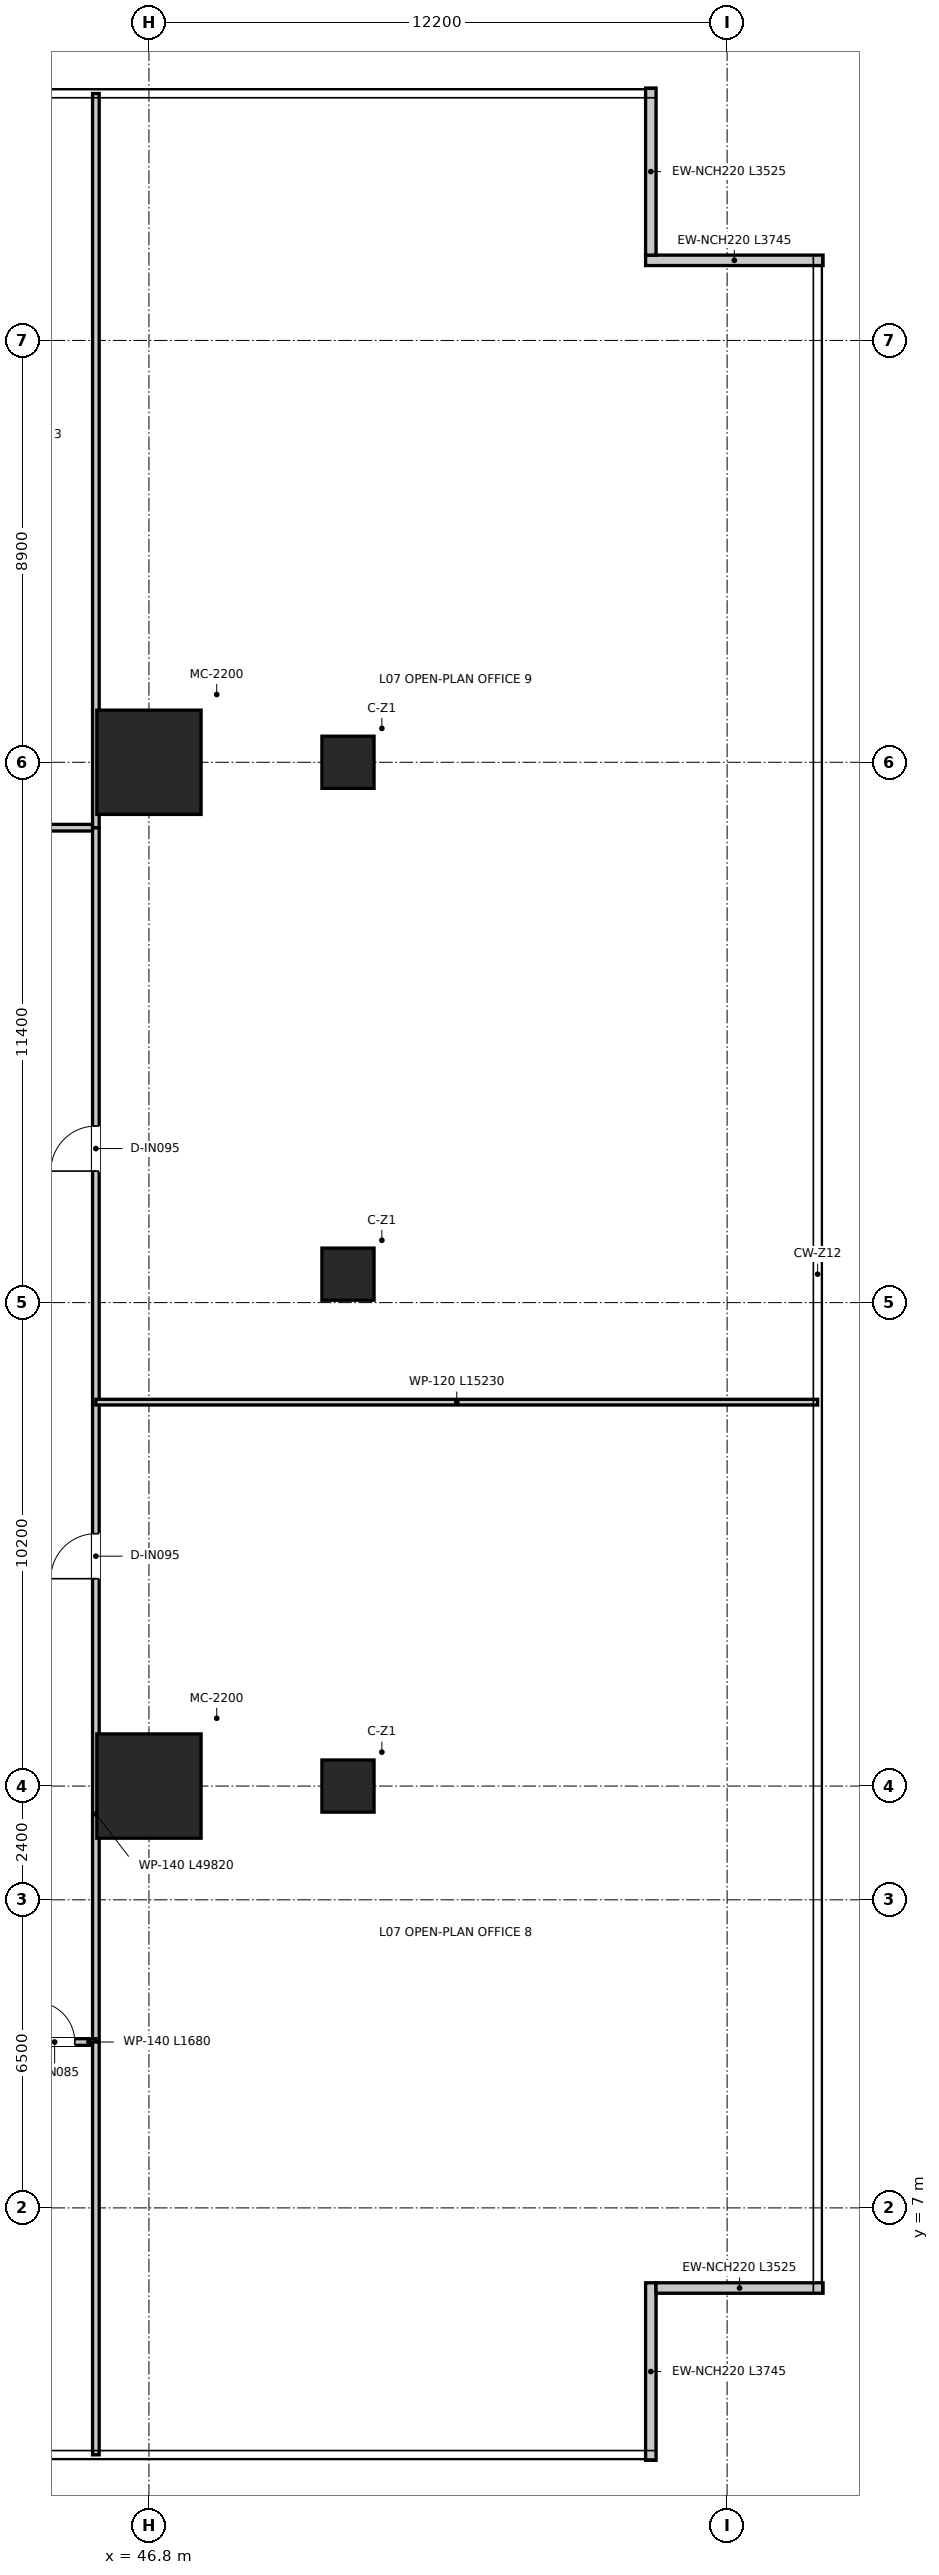
"""IFC4 building model, lengths in metres.
Left out: names, types, materials, properties, quantities, classifications, styles, units other than length and angle.
Written with IfcOpenShell. Run it as: python <this file> out.ifc"""

import sys

from ifc_helpers import new_model, si_unit, direction, frame, frame_2d, origin, origin_2d, place, context, subcontext, project, spatial, rectangle, extrude, source, transform, mapped, element, fill, save


model = new_model("IFC4")
c1 = context("Model", 3, precision=1e-05, world=origin(), true_north=direction((0.0, 1.0)))
c2 = subcontext(c1, "Body", "Model", "MODEL_VIEW")
j1 = project(units=[si_unit("LENGTHUNIT", "METRE"), si_unit("PLANEANGLEUNIT", "RADIAN")], contexts=[c1])
p1 = place(None, origin())
s1 = spatial("IfcSite", under=j1, at=p1, CompositionType="ELEMENT")
p2 = place(p1, origin())
s2 = spatial("IfcBuilding", under=s1, at=p2, CompositionType="ELEMENT")
p3 = place(p2, frame((0.0, 0.0, 32.9)))
s3 = spatial("IfcBuildingStorey", under=s2, at=p3, CompositionType="ELEMENT", Elevation=32.9)
m1 = source(origin(), c2, "Body", "SweptSolid", [
    extrude(rectangle(XDim=2.2, YDim=2.2, at=origin_2d()), origin(), (0.0, 0.0, 1.0), 3.95),
])
for number, where, z_axis, x_axis in (
    (1, (46.8, 15.9, 0.0), (0.0, 0.0, 1.0), (1.0, 0.0, 0.0)),
    (2, (46.8, 37.5, 0.0), (0.0, 0.0, 1.0), (1.0, 0.0, 0.0)),
):
    element("IfcColumn", number, at=place(p3, frame(where, z_axis=z_axis, x_axis=x_axis)), inside=s3, PredefinedType="USERDEFINED", context=c2, shape_type="MappedRepresentation", body=[
        mapped(m1, transform((0.0, 0.0, 0.0), x_axis=(1.0, 0.0, 0.0), y_axis=(0.0, 1.0, 0.0), z_axis=(0.0, 0.0, 1.0), scale=1.0)),
    ])
m2 = source(origin(), c2, "Body", "SweptSolid", [
    extrude(rectangle(XDim=1.1, YDim=1.1, at=origin_2d()), origin(), (0.0, 0.0, 1.0), 3.95),
])
for number, where, z_axis, x_axis in (
    (3, (51.0, 37.5, 0.0), (0.0, 0.0, 1.0), (1.0, 0.0, 0.0)),
    (4, (51.0, 26.7, 0.0), (0.0, 0.0, 1.0), (1.0, 0.0, 0.0)),
    (5, (51.0, 15.9, 0.0), (0.0, 0.0, 1.0), (1.0, 0.0, 0.0)),
):
    element("IfcColumn", number, at=place(p3, frame(where, z_axis=z_axis, x_axis=x_axis)), inside=s3, PredefinedType="COLUMN", context=c2, shape_type="MappedRepresentation", body=[
        mapped(m2, transform((0.0, 0.0, 0.0), x_axis=(1.0, 0.0, 0.0), y_axis=(0.0, 1.0, 0.0), z_axis=(0.0, 0.0, 1.0), scale=1.0)),
    ])
p4 = place(p3, frame((57.39, 1.675, 0.0), z_axis=(0.0, 0.0, 1.0), x_axis=(0.0, 1.0, 0.0)))
e6 = element("IfcWall", 6, at=p4, inside=s3, PredefinedType="ELEMENTEDWALL", context=c2, shape_type="SweptSolid", body=[
    extrude(rectangle(XDim=3.745, YDim=0.22, at=frame_2d((1.873, 0.0))), origin(), (0.0, 0.0, 1.0), 3.67),
])
p5 = place(p3, frame((57.5, 5.31, 0.0), z_axis=(0.0, 0.0, 1.0), x_axis=(1.0, 0.0, 0.0)))
e7 = element("IfcWall", 7, at=p5, inside=s3, PredefinedType="ELEMENTEDWALL", context=c2, shape_type="SweptSolid", body=[
    extrude(rectangle(XDim=3.525, YDim=0.22, at=frame_2d((1.762, 0.0))), origin(), (0.0, 0.0, 1.0), 3.67),
])
p6 = place(p3, frame((61.025, 48.09, 0.0), z_axis=(0.0, 0.0, 1.0), x_axis=(-1.0, 0.0, 0.0)))
e8 = element("IfcWall", 8, at=p6, inside=s3, PredefinedType="ELEMENTEDWALL", context=c2, shape_type="SweptSolid", body=[
    extrude(rectangle(XDim=3.745, YDim=0.22, at=frame_2d((1.873, 0.0))), origin(), (0.0, 0.0, 1.0), 3.67),
])
p7 = place(p3, frame((57.39, 48.2, 0.0), z_axis=(0.0, 0.0, 1.0), x_axis=(0.0, 1.0, 0.0)))
e9 = element("IfcWall", 9, at=p7, inside=s3, PredefinedType="ELEMENTEDWALL", context=c2, shape_type="SweptSolid", body=[
    extrude(rectangle(XDim=3.525, YDim=0.22, at=frame_2d((1.763, 0.0))), origin(), (0.0, 0.0, 1.0), 3.67),
])
p8 = place(p3, frame((26.32, 36.12, 0.0), z_axis=(0.0, 0.0, 1.0), x_axis=(1.0, 0.0, 0.0)))
e10 = element("IfcWall", 10, at=p8, inside=s3, PredefinedType="PARTITIONING", context=c2, shape_type="SweptSolid", body=[
    extrude(rectangle(XDim=19.36, YDim=0.14, at=frame_2d((9.68, 0.0))), origin(), (0.0, 0.0, 1.0), 3.08),
])
p9 = place(p8, frame((2.365, 0.0, 0.0)))
e11 = element("IfcOpeningElement", 11, at=p9, cuts=e10, PredefinedType="OPENING", context=c2, shape_type="SweptSolid", body=[
    extrude(rectangle(XDim=0.95, YDim=2.1, at=frame_2d((0.475, 1.05))), frame((0.0, 0.08, 0.0), z_axis=(0.0, -1.0, 0.0), x_axis=(1.0, 0.0, 0.0)), (0.0, 0.0, 1.0), 0.16),
])
p10 = place(p8, frame((9.205, 0.0, 0.0)))
e12 = element("IfcOpeningElement", 12, at=p10, cuts=e10, PredefinedType="OPENING", context=c2, shape_type="SweptSolid", body=[
    extrude(rectangle(XDim=0.95, YDim=2.1, at=frame_2d((0.475, 1.05))), frame((0.0, 0.08, 0.0), z_axis=(0.0, -1.0, 0.0), x_axis=(1.0, 0.0, 0.0)), (0.0, 0.0, 1.0), 0.16),
])
p11 = place(p8, frame((16.045, 0.0, 0.0)))
e13 = element("IfcOpeningElement", 13, at=p11, cuts=e10, PredefinedType="OPENING", context=c2, shape_type="SweptSolid", body=[
    extrude(rectangle(XDim=0.95, YDim=2.1, at=frame_2d((0.475, 1.05))), frame((0.0, 0.08, 0.0), z_axis=(0.0, -1.0, 0.0), x_axis=(1.0, 0.0, 0.0)), (0.0, 0.0, 1.0), 0.16),
])
p12 = place(p3, frame((45.68, 10.5, 0.0), z_axis=(0.0, 0.0, 1.0), x_axis=(0.0, 1.0, 0.0)))
e14 = element("IfcWall", 14, at=p12, inside=s3, PredefinedType="PARTITIONING", context=c2, shape_type="SweptSolid", body=[
    extrude(rectangle(XDim=25.62, YDim=0.14, at=frame_2d((12.81, 0.0))), origin(), (0.0, 0.0, 1.0), 2.97),
])
p13 = place(p12, frame((9.775, 0.0, 0.0)))
e15 = element("IfcOpeningElement", 15, at=p13, cuts=e14, PredefinedType="OPENING", context=c2, shape_type="SweptSolid", body=[
    extrude(rectangle(XDim=0.95, YDim=2.1, at=frame_2d((0.475, 1.05))), frame((0.0, 0.08, 0.0), z_axis=(0.0, -1.0, 0.0), x_axis=(1.0, 0.0, 0.0)), (0.0, 0.0, 1.0), 0.16),
])
p14 = place(p12, frame((18.375, 0.0, 0.0)))
e16 = element("IfcOpeningElement", 16, at=p14, cuts=e14, PredefinedType="OPENING", context=c2, shape_type="SweptSolid", body=[
    extrude(rectangle(XDim=0.95, YDim=2.1, at=frame_2d((0.475, 1.05))), frame((0.0, 0.08, 0.0), z_axis=(0.0, -1.0, 0.0), x_axis=(1.0, 0.0, 0.0)), (0.0, 0.0, 1.0), 0.16),
])
p15 = place(p3, frame((44.0, 10.5, 0.0), z_axis=(0.0, 0.0, 1.0), x_axis=(1.0, 0.0, 0.0)))
e17 = element("IfcWall", 17, at=p15, inside=s3, PredefinedType="PARTITIONING", context=c2, shape_type="SweptSolid", body=[
    extrude(rectangle(XDim=1.68, YDim=0.14, at=frame_2d((0.84, 0.0))), origin(), (0.0, 0.0, 1.0), 3.67),
])
p16 = place(p15, frame((0.385, 0.0, 0.0)))
e18 = element("IfcOpeningElement", 18, at=p16, cuts=e17, PredefinedType="OPENING", context=c2, shape_type="SweptSolid", body=[
    extrude(rectangle(XDim=0.85, YDim=2.1, at=frame_2d((0.425, 1.05))), frame((0.0, 0.08, 0.0), z_axis=(0.0, -1.0, 0.0), x_axis=(1.0, 0.0, 0.0)), (0.0, 0.0, 1.0), 0.16),
])
p17 = place(p3, frame((45.68, 36.12, 0.0), z_axis=(0.0, 0.0, 1.0), x_axis=(0.0, 1.0, 0.0)))
e19 = element("IfcWall", 19, at=p17, inside=s3, PredefinedType="PARTITIONING", context=c2, shape_type="SweptSolid", body=[
    extrude(rectangle(XDim=15.49, YDim=0.14, at=frame_2d((7.745, 0.0))), origin(), (0.0, 0.0, 1.0), 2.97),
])
p18 = place(p3, frame((45.68, 1.79, 0.0), z_axis=(0.0, 0.0, 1.0), x_axis=(0.0, 1.0, 0.0)))
e20 = element("IfcWall", 20, at=p18, inside=s3, PredefinedType="PARTITIONING", context=c2, shape_type="SweptSolid", body=[
    extrude(rectangle(XDim=8.71, YDim=0.14, at=frame_2d((4.355, 0.0))), origin(), (0.0, 0.0, 1.0), 3.67),
])
p19 = place(p3, frame((45.68, 24.0, 0.0), z_axis=(0.0, 0.0, 1.0), x_axis=(1.0, 0.0, 0.0)))
e21 = element("IfcWall", 21, at=p19, inside=s3, PredefinedType="PARTITIONING", context=c2, shape_type="SweptSolid", body=[
    extrude(rectangle(XDim=15.23, YDim=0.12, at=frame_2d((7.615, 0.0))), origin(), (0.0, 0.0, 1.0), 2.97),
])
p20 = place(p13, origin())
e22 = element("IfcDoor", 22, at=p20, inside=s3, OperationType="SINGLE_SWING_LEFT", PredefinedType="DOOR", context=c2, shape_type="SweptSolid", body=[
    extrude(rectangle(XDim=0.95, YDim=2.1, at=frame_2d((0.475, 1.05))), frame((0.0, 0.025, 0.0), z_axis=(0.0, -1.0, 0.0), x_axis=(1.0, 0.0, 0.0)), (0.0, 0.0, 1.0), 0.05),
])
fill(e15, e22)
p21 = place(p14, origin())
e23 = element("IfcDoor", 23, at=p21, inside=s3, OperationType="SINGLE_SWING_LEFT", PredefinedType="DOOR", context=c2, shape_type="SweptSolid", body=[
    extrude(rectangle(XDim=0.95, YDim=2.1, at=frame_2d((0.475, 1.05))), frame((0.0, 0.025, 0.0), z_axis=(0.0, -1.0, 0.0), x_axis=(1.0, 0.0, 0.0)), (0.0, 0.0, 1.0), 0.05),
])
fill(e16, e23)
p22 = place(p16, origin())
e24 = element("IfcDoor", 24, at=p22, inside=s3, OperationType="SINGLE_SWING_LEFT", PredefinedType="DOOR", context=c2, shape_type="SweptSolid", body=[
    extrude(rectangle(XDim=0.85, YDim=2.1, at=frame_2d((0.425, 1.05))), frame((0.0, 0.025, 0.0), z_axis=(0.0, -1.0, 0.0), x_axis=(1.0, 0.0, 0.0)), (0.0, 0.0, 1.0), 0.05),
])
fill(e18, e24)
save(model, sys.argv[1])
